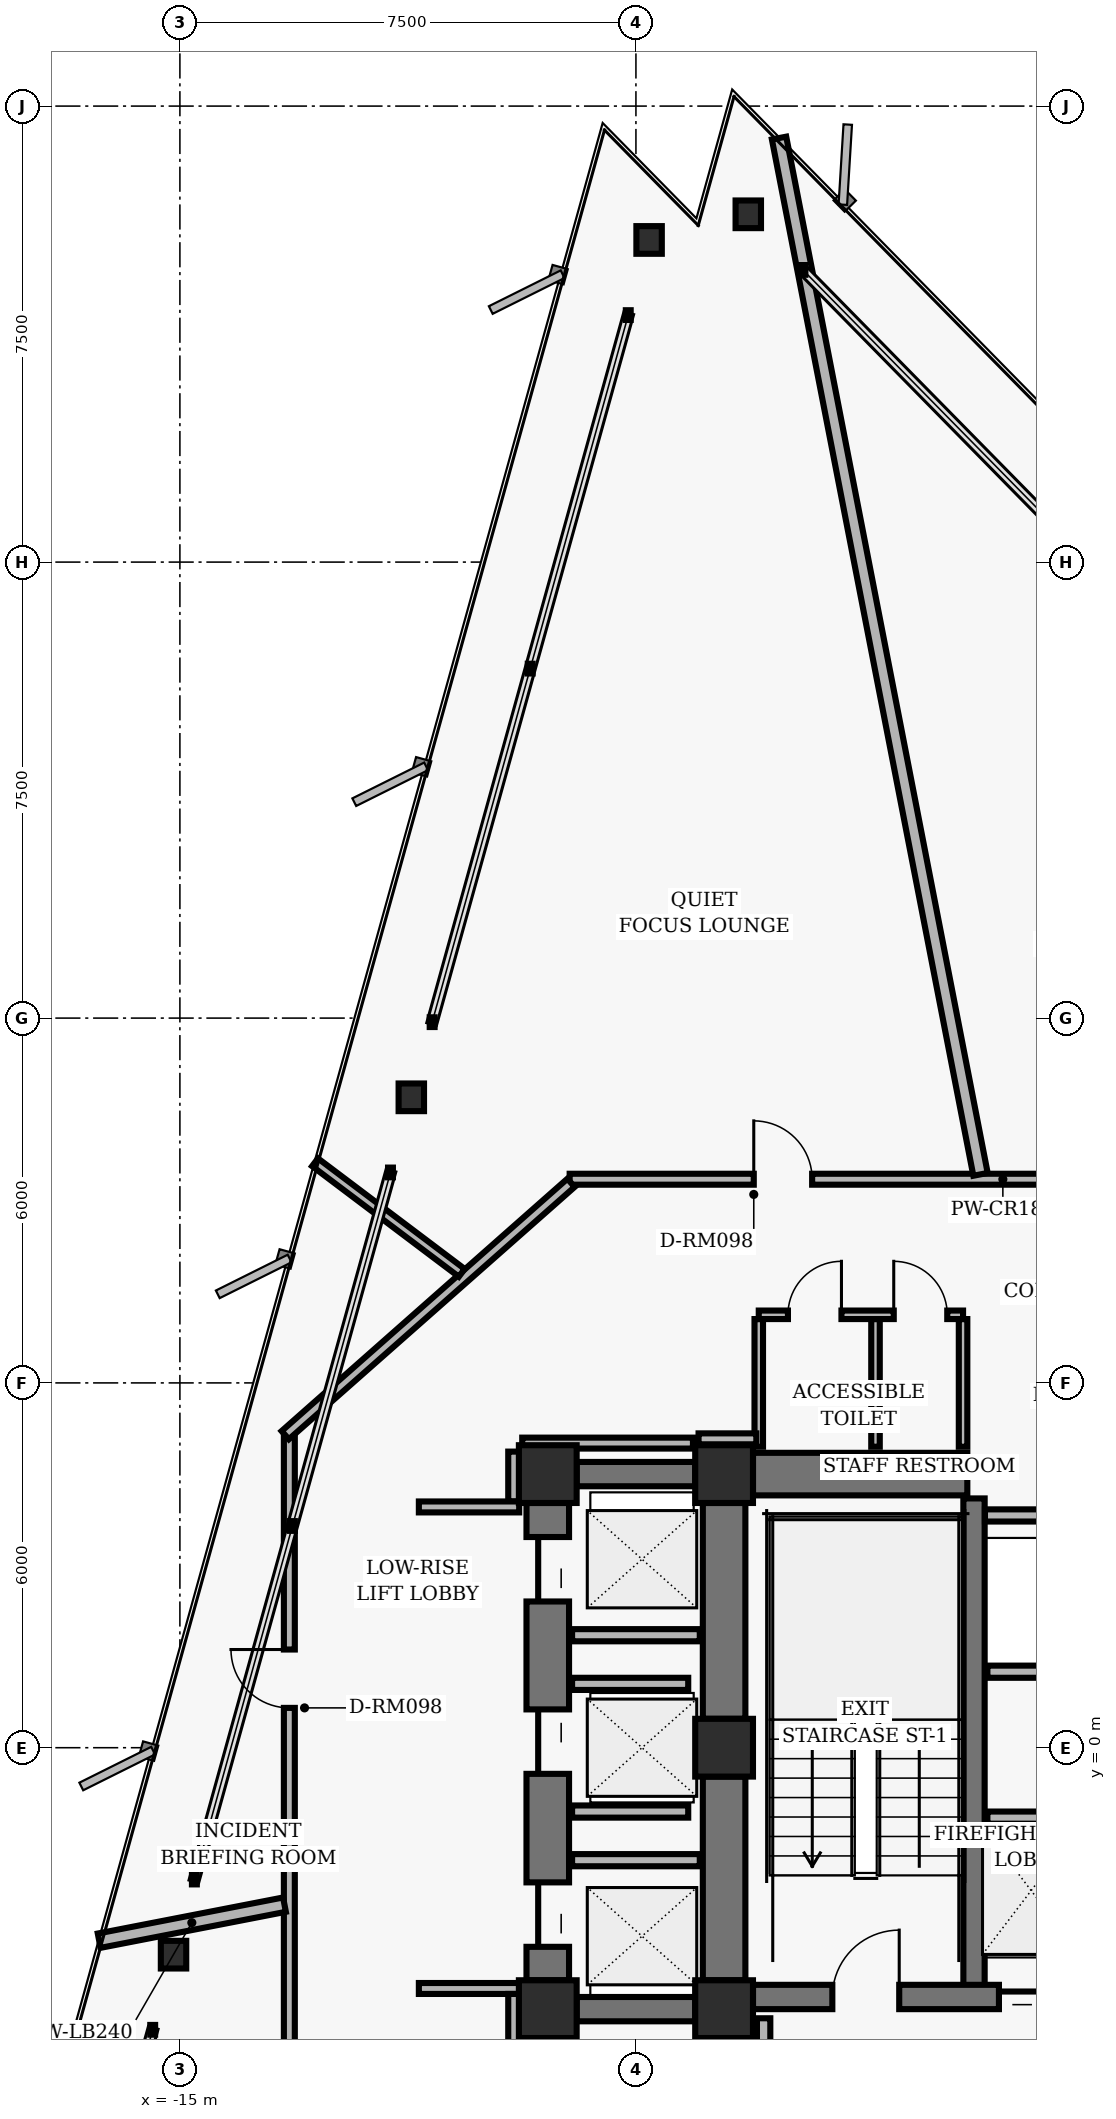
"""IFC4 building model, lengths in metres.
Left out: names, types, materials, properties, quantities, classifications, styles, units other than length and angle.
Written with IfcOpenShell. Run it as: python <this file> out.ifc"""

import sys

from ifc_helpers import new_model, si_unit, direction, frame, frame_2d, origin, origin_2d, place, context, subcontext, project, spatial, rectangle, hollow_rectangle, i_section, extrude, element, fill, save


model = new_model("IFC4")
c1 = context("Model", 3, precision=1e-05, world=origin(), true_north=direction((0.0, 1.0)))
c2 = subcontext(c1, "Body", "Model", "MODEL_VIEW")
j1 = project(units=[si_unit("LENGTHUNIT", "METRE"), si_unit("PLANEANGLEUNIT", "RADIAN")], contexts=[c1])
p1 = place(None, origin())
s1 = spatial("IfcSite", under=j1, at=p1, CompositionType="ELEMENT")
p2 = place(p1, origin())
s2 = spatial("IfcBuilding", under=s1, at=p2, CompositionType="ELEMENT")
p3 = place(p2, frame((0.0, 0.0, 76.48)))
s3 = spatial("IfcBuildingStorey", under=s2, at=p3, CompositionType="ELEMENT", Elevation=76.48)
for number, where, z_axis, x_axis in (
    (1, (-6.05, 4.5, 0.0), (0.0, 0.0, 1.0), (1.0, 0.0, 0.0)),
    (2, (-6.05, 0.0, 0.0), (0.0, 0.0, 1.0), (1.0, 0.0, 0.0)),
    (3, (-6.05, -4.3, 0.0), (0.0, 0.0, 1.0), (1.0, 0.0, 0.0)),
    (4, (-8.95, 4.5, 0.0), (0.0, 0.0, 1.0), (1.0, 0.0, 0.0)),
    (5, (-8.95, -4.3, 0.0), (0.0, 0.0, 1.0), (1.0, 0.0, 0.0)),
):
    element("IfcColumn", number, at=place(p3, frame(where, z_axis=z_axis, x_axis=x_axis)), inside=s3, PredefinedType="COLUMN", context=c2, shape_type="SweptSolid", body=[
        extrude(hollow_rectangle(XDim=0.95, YDim=0.95, WallThickness=0.06, InnerFilletRadius=0.02, OuterFilletRadius=0.04, at=origin_2d()), origin(), (0.0, 0.0, 1.0), 3.04),
    ])
p4 = place(p3, frame((-6.05, 0.475, 0.0), z_axis=(0.0, 0.0, 1.0), x_axis=(0.0, 1.0, 0.0)))
e6 = element("IfcWall", 6, at=p4, inside=s3, PredefinedType="SHEAR", context=c2, shape_type="SweptSolid", body=[
    extrude(rectangle(XDim=3.55, YDim=0.7, at=frame_2d((1.775, 0.0))), origin(), (0.0, 0.0, 1.0), 2.788),
])
p5 = place(p3, frame((-6.05, -3.825, 0.0), z_axis=(0.0, 0.0, 1.0), x_axis=(0.0, 1.0, 0.0)))
e7 = element("IfcWall", 7, at=p5, inside=s3, PredefinedType="SHEAR", context=c2, shape_type="SweptSolid", body=[
    extrude(rectangle(XDim=3.35, YDim=0.7, at=frame_2d((1.675, 0.0))), origin(), (0.0, 0.0, 1.0), 2.788),
])
p6 = place(p3, frame((-1.94, -4.1, 0.0), z_axis=(0.0, 0.0, 1.0), x_axis=(0.0, 1.0, 0.0)))
e8 = element("IfcWall", 8, at=p6, inside=s3, PredefinedType="SHEAR", context=c2, shape_type="SweptSolid", body=[
    extrude(rectangle(XDim=8.2, YDim=0.35, at=frame_2d((4.1, 0.0))), origin(), (0.0, 0.0, 1.0), 2.788),
])
p7 = place(p3, frame((-5.575, -4.1, 0.0), z_axis=(0.0, 0.0, 1.0), x_axis=(1.0, 0.0, 0.0)))
e9 = element("IfcWall", 9, at=p7, inside=s3, PredefinedType="SHEAR", context=c2, shape_type="SweptSolid", body=[
    extrude(rectangle(XDim=11.15, YDim=0.4, at=frame_2d((5.575, 0.0))), origin(), (0.0, 0.0, 1.0), 2.788),
])
p8 = place(p7, frame((1.305, 0.0, 0.0)))
e10 = element("IfcOpeningElement", 10, at=p8, cuts=e9, PredefinedType="OPENING", context=c2, shape_type="SweptSolid", body=[
    extrude(rectangle(XDim=1.1, YDim=2.04, at=frame_2d((0.55, 1.02))), frame((0.0, 0.21, 0.0), z_axis=(0.0, -1.0, 0.0), x_axis=(1.0, 0.0, 0.0)), (0.0, 0.0, 1.0), 0.42),
])
p9 = place(p7, frame((8.745, 0.0, 0.0)))
e11 = element("IfcOpeningElement", 11, at=p9, cuts=e9, PredefinedType="OPENING", context=c2, shape_type="SweptSolid", body=[
    extrude(rectangle(XDim=1.1, YDim=2.04, at=frame_2d((0.55, 1.02))), frame((0.0, 0.21, 0.0), z_axis=(0.0, -1.0, 0.0), x_axis=(1.0, 0.0, 0.0)), (0.0, 0.0, 1.0), 0.42),
])
p10 = place(p7, frame((4.045, 0.0, 0.0)))
e12 = element("IfcOpeningElement", 12, at=p10, cuts=e9, PredefinedType="OPENING", context=c2, shape_type="SweptSolid", body=[
    extrude(rectangle(XDim=1.06, YDim=2.04, at=frame_2d((0.53, 1.02))), frame((0.0, 0.21, 0.0), z_axis=(0.0, -1.0, 0.0), x_axis=(1.0, 0.0, 0.0)), (0.0, 0.0, 1.0), 0.42),
])
p11 = place(p7, frame((6.045, 0.0, 0.0)))
e13 = element("IfcOpeningElement", 13, at=p11, cuts=e9, PredefinedType="OPENING", context=c2, shape_type="SweptSolid", body=[
    extrude(rectangle(XDim=1.06, YDim=2.04, at=frame_2d((0.53, 1.02))), frame((0.0, 0.21, 0.0), z_axis=(0.0, -1.0, 0.0), x_axis=(1.0, 0.0, 0.0)), (0.0, 0.0, 1.0), 0.42),
])
p12 = place(p3, frame((-5.575, 4.5, 0.0), z_axis=(0.0, 0.0, 1.0), x_axis=(1.0, 0.0, 0.0)))
e14 = element("IfcWall", 14, at=p12, inside=s3, PredefinedType="SHEAR", context=c2, shape_type="SweptSolid", body=[
    extrude(rectangle(XDim=3.525, YDim=0.7, at=frame_2d((1.762, 0.0))), origin(), (0.0, 0.0, 1.0), 2.788),
])
p13 = place(p3, frame((-8.95, -3.825, 0.0), z_axis=(0.0, 0.0, 1.0), x_axis=(0.0, 1.0, 0.0)))
e15 = element("IfcWall", 15, at=p13, inside=s3, PredefinedType="SHEAR", context=c2, shape_type="SweptSolid", body=[
    extrude(rectangle(XDim=7.85, YDim=0.7, at=frame_2d((3.925, 0.0))), origin(), (0.0, 0.0, 1.0), 2.788),
])
p14 = place(p13, frame((0.55, 0.0, 0.0)))
e16 = element("IfcOpeningElement", 16, at=p14, cuts=e15, PredefinedType="OPENING", context=c2, shape_type="SweptSolid", body=[
    extrude(rectangle(XDim=1.06, YDim=2.04, at=frame_2d((0.53, 1.02))), frame((0.0, 0.36, 0.0), z_axis=(0.0, -1.0, 0.0), x_axis=(1.0, 0.0, 0.0)), (0.0, 0.0, 1.0), 0.72),
])
p15 = place(p13, frame((3.395, 0.0, 0.0)))
e17 = element("IfcOpeningElement", 17, at=p15, cuts=e15, PredefinedType="OPENING", context=c2, shape_type="SweptSolid", body=[
    extrude(rectangle(XDim=1.06, YDim=2.04, at=frame_2d((0.53, 1.02))), frame((0.0, 0.36, 0.0), z_axis=(0.0, -1.0, 0.0), x_axis=(1.0, 0.0, 0.0)), (0.0, 0.0, 1.0), 0.72),
])
p16 = place(p13, frame((6.23, 0.0, 0.0)))
e18 = element("IfcOpeningElement", 18, at=p16, cuts=e15, PredefinedType="OPENING", context=c2, shape_type="SweptSolid", body=[
    extrude(rectangle(XDim=1.06, YDim=2.04, at=frame_2d((0.53, 1.02))), frame((0.0, 0.36, 0.0), z_axis=(0.0, -1.0, 0.0), x_axis=(1.0, 0.0, 0.0)), (0.0, 0.0, 1.0), 0.72),
])
for number, where, z_axis, x_axis in (
    (19, (-8.475, 4.5, 0.0), (0.0, 0.0, 1.0), (1.0, 0.0, 0.0)),
    (20, (-8.475, -4.3, 0.0), (0.0, 0.0, 1.0), (1.0, 0.0, 0.0)),
):
    element("IfcWall", number, at=place(p3, frame(where, z_axis=z_axis, x_axis=x_axis)), inside=s3, PredefinedType="SHEAR", context=c2, shape_type="SweptSolid", body=[
        extrude(rectangle(XDim=1.95, YDim=0.4, at=frame_2d((0.975, 0.0))), origin(), (0.0, 0.0, 1.0), 2.788),
    ])
for number, where, z_axis, x_axis in (
    (21, (-5.652, 25.22, 0.0), (0.0, 0.0, 1.0), (1.0, 0.0, 0.0)),
    (22, (-7.283, 24.798, 0.0), (0.0, 0.0, 1.0), (1.0, 0.0, 0.0)),
    (23, (-11.194, 10.697, 0.0), (0.0, 0.0, 1.0), (1.0, 0.0, 0.0)),
    (24, (-15.104, -3.404, 0.0), (0.0, 0.0, 1.0), (1.0, 0.0, 0.0)),
):
    element("IfcColumn", number, at=place(p3, frame(where, z_axis=z_axis, x_axis=x_axis)), inside=s3, PredefinedType="COLUMN", context=c2, shape_type="SweptSolid", body=[
        extrude(i_section(OverallWidth=0.418, OverallDepth=0.455, WebThickness=0.042, FlangeThickness=0.068, FilletRadius=0.025, at=origin_2d()), origin(), (0.0, 0.0, 1.0), 3.04),
    ])
p17 = place(p3, frame((-1.72, -1.15, 0.0), z_axis=(0.0, 0.0, 1.0), x_axis=(1.0, 0.0, 0.0)))
e25 = element("IfcWall", 25, at=p17, inside=s3, PredefinedType="PARTITIONING", context=c2, shape_type="SweptSolid", body=[
    extrude(rectangle(XDim=3.44, YDim=0.2, at=frame_2d((1.72, 0.0))), origin(), (0.0, 0.0, 1.0), 2.763),
])
p18 = place(p3, frame((-5.4, -7.16, 0.0), z_axis=(0.0, 0.0, 1.0), x_axis=(0.0, 1.0, 0.0)))
e26 = element("IfcWall", 26, at=p18, inside=s3, PredefinedType="PARTITIONING", context=c2, shape_type="SweptSolid", body=[
    extrude(rectangle(XDim=2.71, YDim=0.22, at=frame_2d((1.355, 0.0))), origin(), (0.0, 0.0, 1.0), 2.763),
])
p19 = place(p3, frame((-1.72, 1.25, 0.0), z_axis=(0.0, 0.0, 1.0), x_axis=(1.0, 0.0, 0.0)))
e27 = element("IfcWall", 27, at=p19, inside=s3, PredefinedType="PARTITIONING", context=c2, shape_type="SweptSolid", body=[
    extrude(rectangle(XDim=3.44, YDim=0.2, at=frame_2d((1.72, 0.0))), origin(), (0.0, 0.0, 1.0), 2.763),
])
p20 = place(p3, frame((-1.76, 3.82, 0.0), z_axis=(0.0, 0.0, 1.0), x_axis=(1.0, 0.0, 0.0)))
e28 = element("IfcWall", 28, at=p20, inside=s3, PredefinedType="PARTITIONING", context=c2, shape_type="SweptSolid", body=[
    extrude(rectangle(XDim=3.52, YDim=0.2, at=frame_2d((1.76, 0.0))), origin(), (0.0, 0.0, 1.0), 2.763),
])
for number, where, z_axis, x_axis in (
    (29, (-5.48, 4.95, 0.0), (0.0, 0.0, 1.0), (0.0, 1.0, 0.0)),
    (30, (-3.56, 4.95, 0.0), (0.0, 0.0, 1.0), (0.0, 1.0, 0.0)),
    (31, (-2.12, 4.95, 0.0), (0.0, 0.0, 1.0), (0.0, 1.0, 0.0)),
):
    element("IfcWall", number, at=place(p3, frame(where, z_axis=z_axis, x_axis=x_axis)), inside=s3, PredefinedType="PARTITIONING", context=c2, shape_type="SweptSolid", body=[
        extrude(rectangle(XDim=2.1, YDim=0.14, at=frame_2d((1.05, 0.0))), origin(), (0.0, 0.0, 1.0), 2.763),
    ])
p21 = place(p3, frame((-5.48, 7.12, 0.0), z_axis=(0.0, 0.0, 1.0), x_axis=(1.0, 0.0, 0.0)))
e32 = element("IfcWall", 32, at=p21, inside=s3, PredefinedType="PARTITIONING", context=c2, shape_type="SweptSolid", body=[
    extrude(rectangle(XDim=3.36, YDim=0.14, at=frame_2d((1.68, 0.0))), origin(), (0.0, 0.0, 1.0), 2.763),
])
p22 = place(p21, frame((0.48, 0.0, 0.0)))
e33 = element("IfcOpeningElement", 33, at=p22, cuts=e32, PredefinedType="OPENING", context=c2, shape_type="SweptSolid", body=[
    extrude(rectangle(XDim=0.88, YDim=2.02, at=frame_2d((0.44, 1.01))), frame((0.0, 0.08, 0.0), z_axis=(0.0, -1.0, 0.0), x_axis=(1.0, 0.0, 0.0)), (0.0, 0.0, 1.0), 0.16),
])
p23 = place(p21, frame((2.22, 0.0, 0.0)))
e34 = element("IfcOpeningElement", 34, at=p23, cuts=e32, PredefinedType="OPENING", context=c2, shape_type="SweptSolid", body=[
    extrude(rectangle(XDim=0.88, YDim=2.02, at=frame_2d((0.44, 1.01))), frame((0.0, 0.08, 0.0), z_axis=(0.0, -1.0, 0.0), x_axis=(1.0, 0.0, 0.0)), (0.0, 0.0, 1.0), 0.16),
])
for number, where, z_axis, x_axis in (
    (35, (-8.55, -1.85, 0.0), (0.0, 0.0, 1.0), (1.0, 0.0, 0.0)),
    (36, (-8.55, 1.85, 0.0), (0.0, 0.0, 1.0), (1.0, 0.0, 0.0)),
):
    element("IfcWall", number, at=place(p3, frame(where, z_axis=z_axis, x_axis=x_axis)), inside=s3, PredefinedType="PARTITIONING", context=c2, shape_type="SweptSolid", body=[
        extrude(rectangle(XDim=2.1, YDim=0.2, at=frame_2d((1.05, 0.0))), origin(), (0.0, 0.0, 1.0), 2.763),
    ])
for number, where, z_axis, x_axis in (
    (37, (-8.55, -1.05, 0.0), (0.0, 0.0, 1.0), (1.0, 0.0, 0.0)),
    (38, (-8.55, 1.05, 0.0), (0.0, 0.0, 1.0), (1.0, 0.0, 0.0)),
):
    element("IfcWall", number, at=place(p3, frame(where, z_axis=z_axis, x_axis=x_axis)), inside=s3, PredefinedType="PARTITIONING", context=c2, shape_type="SweptSolid", body=[
        extrude(rectangle(XDim=1.91, YDim=0.2, at=frame_2d((0.955, 0.0))), origin(), (0.0, 0.0, 1.0), 2.763),
    ])
p24 = place(p3, frame((-8.59, 9.35, 0.0), z_axis=(0.0, 0.0, 1.0), x_axis=(1.0, 0.0, 0.0)))
e39 = element("IfcWall", 39, at=p24, inside=s3, PredefinedType="PARTITIONING", context=c2, shape_type="SweptSolid", body=[
    extrude(rectangle(XDim=17.18, YDim=0.18, at=frame_2d((8.59, 0.0))), origin(), (0.0, 0.0, 1.0), 2.277),
])
p25 = place(p24, frame((10.261, 0.0, 0.0)))
e40 = element("IfcOpeningElement", 40, at=p25, cuts=e39, PredefinedType="OPENING", context=c2, shape_type="SweptSolid", body=[
    extrude(rectangle(XDim=0.96, YDim=2.02, at=frame_2d((0.48, 1.01))), frame((0.0, 0.1, 0.0), z_axis=(0.0, -1.0, 0.0), x_axis=(1.0, 0.0, 0.0)), (0.0, 0.0, 1.0), 0.2),
])
p26 = place(p24, frame((3.028, 0.0, 0.0)))
e41 = element("IfcOpeningElement", 41, at=p26, cuts=e39, PredefinedType="OPENING", context=c2, shape_type="SweptSolid", body=[
    extrude(rectangle(XDim=0.96, YDim=2.02, at=frame_2d((0.48, 1.01))), frame((0.0, 0.1, 0.0), z_axis=(0.0, -1.0, 0.0), x_axis=(1.0, 0.0, 0.0)), (0.0, 0.0, 1.0), 0.2),
])
p27 = place(p3, frame((-13.2, -5.11, 0.0), z_axis=(0.0, 0.0, 1.0), x_axis=(0.0, 1.0, 0.0)))
e42 = element("IfcWall", 42, at=p27, inside=s3, PredefinedType="PARTITIONING", context=c2, shape_type="SweptSolid", body=[
    extrude(rectangle(XDim=10.22, YDim=0.18, at=frame_2d((5.11, 0.0))), origin(), (0.0, 0.0, 1.0), 2.143),
])
p28 = place(p27, frame((5.765, 0.0, 0.0)))
e43 = element("IfcOpeningElement", 43, at=p28, cuts=e42, PredefinedType="OPENING", context=c2, shape_type="SweptSolid", body=[
    extrude(rectangle(XDim=0.96, YDim=2.02, at=frame_2d((0.48, 1.01))), frame((0.0, 0.1, 0.0), z_axis=(0.0, -1.0, 0.0), x_axis=(1.0, 0.0, 0.0)), (0.0, 0.0, 1.0), 0.2),
])
p29 = place(p3, frame((-13.268, 5.14, 0.0), z_axis=(0.0, 0.0, 1.0), x_axis=(0.749626463267, 0.66186113768, 0.0)))
e44 = element("IfcWall", 44, at=p29, inside=s3, PredefinedType="PARTITIONING", context=c2, shape_type="SweptSolid", body=[
    extrude(rectangle(XDim=6.27, YDim=0.18, at=frame_2d((3.135, 0.0))), origin(), (0.0, 0.0, 1.0), 2.763),
])
p30 = place(p3, frame((-9.51, 4.87, 0.0), z_axis=(0.0, 0.0, 1.0), x_axis=(0.0, -1.0, 0.0)))
e45 = element("IfcWall", 45, at=p30, inside=s3, PredefinedType="PARTITIONING", context=c2, shape_type="SweptSolid", body=[
    extrude(rectangle(XDim=0.82, YDim=0.18, at=frame_2d((0.41, 0.0))), origin(), (0.0, 0.0, 1.0), 2.277),
])
p31 = place(p3, frame((-9.42, 3.96, 0.0), z_axis=(0.0, 0.0, 1.0), x_axis=(-1.0, 0.0, 0.0)))
e46 = element("IfcWall", 46, at=p31, inside=s3, PredefinedType="PARTITIONING", context=c2, shape_type="SweptSolid", body=[
    extrude(rectangle(XDim=1.65, YDim=0.18, at=frame_2d((0.825, 0.0))), origin(), (0.0, 0.0, 1.0), 2.763),
])
p32 = place(p3, frame((-11.07, -3.96, 0.0), z_axis=(0.0, 0.0, 1.0), x_axis=(1.0, 0.0, 0.0)))
e47 = element("IfcWall", 47, at=p32, inside=s3, PredefinedType="PARTITIONING", context=c2, shape_type="SweptSolid", body=[
    extrude(rectangle(XDim=1.65, YDim=0.18, at=frame_2d((0.825, 0.0))), origin(), (0.0, 0.0, 1.0), 2.048),
])
p33 = place(p3, frame((-9.51, -4.05, 0.0), z_axis=(0.0, 0.0, 1.0), x_axis=(0.0, -1.0, 0.0)))
e48 = element("IfcWall", 48, at=p33, inside=s3, PredefinedType="PARTITIONING", context=c2, shape_type="SweptSolid", body=[
    extrude(rectangle(XDim=0.82, YDim=0.18, at=frame_2d((0.41, 0.0))), origin(), (0.0, 0.0, 1.0), 2.763),
])
p34 = place(p3, frame((-5.52, 5.08, 0.0), z_axis=(0.0, 0.0, 1.0), x_axis=(-1.0, 0.0, 0.0)))
e49 = element("IfcWall", 49, at=p34, inside=s3, PredefinedType="PARTITIONING", context=c2, shape_type="SweptSolid", body=[
    extrude(rectangle(XDim=0.95, YDim=0.18, at=frame_2d((0.475, 0.0))), origin(), (0.0, 0.0, 1.0), 2.763),
])
p35 = place(p3, frame((-6.562, 5.01, 0.0), z_axis=(0.0, 0.0, 1.0), x_axis=(-1.0, 0.0, 0.0)))
e50 = element("IfcWall", 50, at=p35, inside=s3, PredefinedType="PARTITIONING", context=c2, shape_type="SweptSolid", body=[
    extrude(rectangle(XDim=2.808, YDim=0.18, at=frame_2d((1.404, 0.0))), origin(), (0.0, 0.0, 1.0), 2.763),
])
p36 = place(p3, frame((-13.28, -2.581, 0.0), z_axis=(0.0, 0.0, 1.0), x_axis=(-0.98161907283, -0.190850716155, 0.0)))
e51 = element("IfcWall", 51, at=p36, inside=s3, PredefinedType="PARTITIONING", context=c2, shape_type="SweptSolid", body=[
    extrude(rectangle(XDim=3.105, YDim=0.24, at=frame_2d((1.552, 0.0))), origin(), (0.0, 0.0, 1.0), 2.763),
])
p37 = place(p3, frame((-1.833, 9.43, 0.0), z_axis=(0.0, 0.0, 1.0), x_axis=(-0.190802669454, 0.981628413061, 0.0)))
e52 = element("IfcWall", 52, at=p37, inside=s3, PredefinedType="PARTITIONING", context=c2, shape_type="SweptSolid", body=[
    extrude(rectangle(XDim=17.364, YDim=0.24, at=frame_2d((8.682, 0.0))), origin(), (0.0, 0.0, 1.0), 2.763),
])
p38 = place(p3, frame((-10.365, 7.81, 0.0), z_axis=(0.0, 0.0, 1.0), x_axis=(-0.79865006228, 0.601795711201, 0.0)))
e53 = element("IfcWall", 53, at=p38, inside=s3, PredefinedType="PARTITIONING", context=c2, shape_type="SweptSolid", body=[
    extrude(rectangle(XDim=3.021, YDim=0.16, at=frame_2d((1.511, 0.0))), origin(), (0.0, 0.0, 1.0), 2.763),
])
p39 = place(p8, origin())
e54 = element("IfcDoor", 54, at=p39, inside=s3, OperationType="SINGLE_SWING_RIGHT", PredefinedType="DOOR", context=c2, shape_type="SweptSolid", body=[
    extrude(rectangle(XDim=1.1, YDim=2.04, at=frame_2d((0.55, 1.02))), frame((0.0, 0.025, 0.0), z_axis=(0.0, -1.0, 0.0), x_axis=(1.0, 0.0, 0.0)), (0.0, 0.0, 1.0), 0.05),
])
fill(e10, e54)
p40 = place(p10, origin())
e55 = element("IfcDoor", 55, at=p40, inside=s3, OperationType="SLIDING_TO_LEFT", PredefinedType="DOOR", context=c2, shape_type="SweptSolid", body=[
    extrude(rectangle(XDim=1.06, YDim=2.04, at=frame_2d((0.53, 1.02))), frame((0.0, 0.025, 0.0), z_axis=(0.0, -1.0, 0.0), x_axis=(1.0, 0.0, 0.0)), (0.0, 0.0, 1.0), 0.05),
])
fill(e12, e55)
p41 = place(p22, origin())
e56 = element("IfcDoor", 56, at=p41, inside=s3, OperationType="SINGLE_SWING_RIGHT", PredefinedType="DOOR", context=c2, shape_type="SweptSolid", body=[
    extrude(rectangle(XDim=0.88, YDim=2.02, at=frame_2d((0.44, 1.01))), frame((0.0, 0.025, 0.0), z_axis=(0.0, -1.0, 0.0), x_axis=(1.0, 0.0, 0.0)), (0.0, 0.0, 1.0), 0.05),
])
fill(e33, e56)
p42 = place(p23, origin())
e57 = element("IfcDoor", 57, at=p42, inside=s3, OperationType="SINGLE_SWING_LEFT", PredefinedType="DOOR", context=c2, shape_type="SweptSolid", body=[
    extrude(rectangle(XDim=0.88, YDim=2.02, at=frame_2d((0.44, 1.01))), frame((0.0, 0.025, 0.0), z_axis=(0.0, -1.0, 0.0), x_axis=(1.0, 0.0, 0.0)), (0.0, 0.0, 1.0), 0.05),
])
fill(e34, e57)
p43 = place(p14, origin())
e58 = element("IfcDoor", 58, at=p43, inside=s3, OperationType="SLIDING_TO_LEFT", PredefinedType="DOOR", context=c2, shape_type="SweptSolid", body=[
    extrude(rectangle(XDim=1.06, YDim=2.04, at=frame_2d((0.53, 1.02))), frame((0.0, 0.025, 0.0), z_axis=(0.0, -1.0, 0.0), x_axis=(1.0, 0.0, 0.0)), (0.0, 0.0, 1.0), 0.05),
])
fill(e16, e58)
p44 = place(p15, origin())
e59 = element("IfcDoor", 59, at=p44, inside=s3, OperationType="SLIDING_TO_RIGHT", PredefinedType="DOOR", context=c2, shape_type="SweptSolid", body=[
    extrude(rectangle(XDim=1.06, YDim=2.04, at=frame_2d((0.53, 1.02))), frame((0.0, 0.025, 0.0), z_axis=(0.0, -1.0, 0.0), x_axis=(1.0, 0.0, 0.0)), (0.0, 0.0, 1.0), 0.05),
])
fill(e17, e59)
p45 = place(p16, origin())
e60 = element("IfcDoor", 60, at=p45, inside=s3, OperationType="SLIDING_TO_LEFT", PredefinedType="DOOR", context=c2, shape_type="SweptSolid", body=[
    extrude(rectangle(XDim=1.06, YDim=2.04, at=frame_2d((0.53, 1.02))), frame((0.0, 0.025, 0.0), z_axis=(0.0, -1.0, 0.0), x_axis=(1.0, 0.0, 0.0)), (0.0, 0.0, 1.0), 0.05),
])
fill(e18, e60)
p46 = place(p26, origin())
e61 = element("IfcDoor", 61, at=p46, inside=s3, OperationType="SINGLE_SWING_LEFT", PredefinedType="DOOR", context=c2, shape_type="SweptSolid", body=[
    extrude(rectangle(XDim=0.96, YDim=2.02, at=frame_2d((0.48, 1.01))), frame((0.0, 0.025, 0.0), z_axis=(0.0, -1.0, 0.0), x_axis=(1.0, 0.0, 0.0)), (0.0, 0.0, 1.0), 0.05),
])
fill(e41, e61)
p47 = place(p28, origin())
e62 = element("IfcDoor", 62, at=p47, inside=s3, OperationType="SINGLE_SWING_RIGHT", PredefinedType="DOOR", context=c2, shape_type="SweptSolid", body=[
    extrude(rectangle(XDim=0.96, YDim=2.02, at=frame_2d((0.48, 1.01))), frame((0.0, 0.025, 0.0), z_axis=(0.0, -1.0, 0.0), x_axis=(1.0, 0.0, 0.0)), (0.0, 0.0, 1.0), 0.05),
])
fill(e43, e62)
save(model, sys.argv[1])
